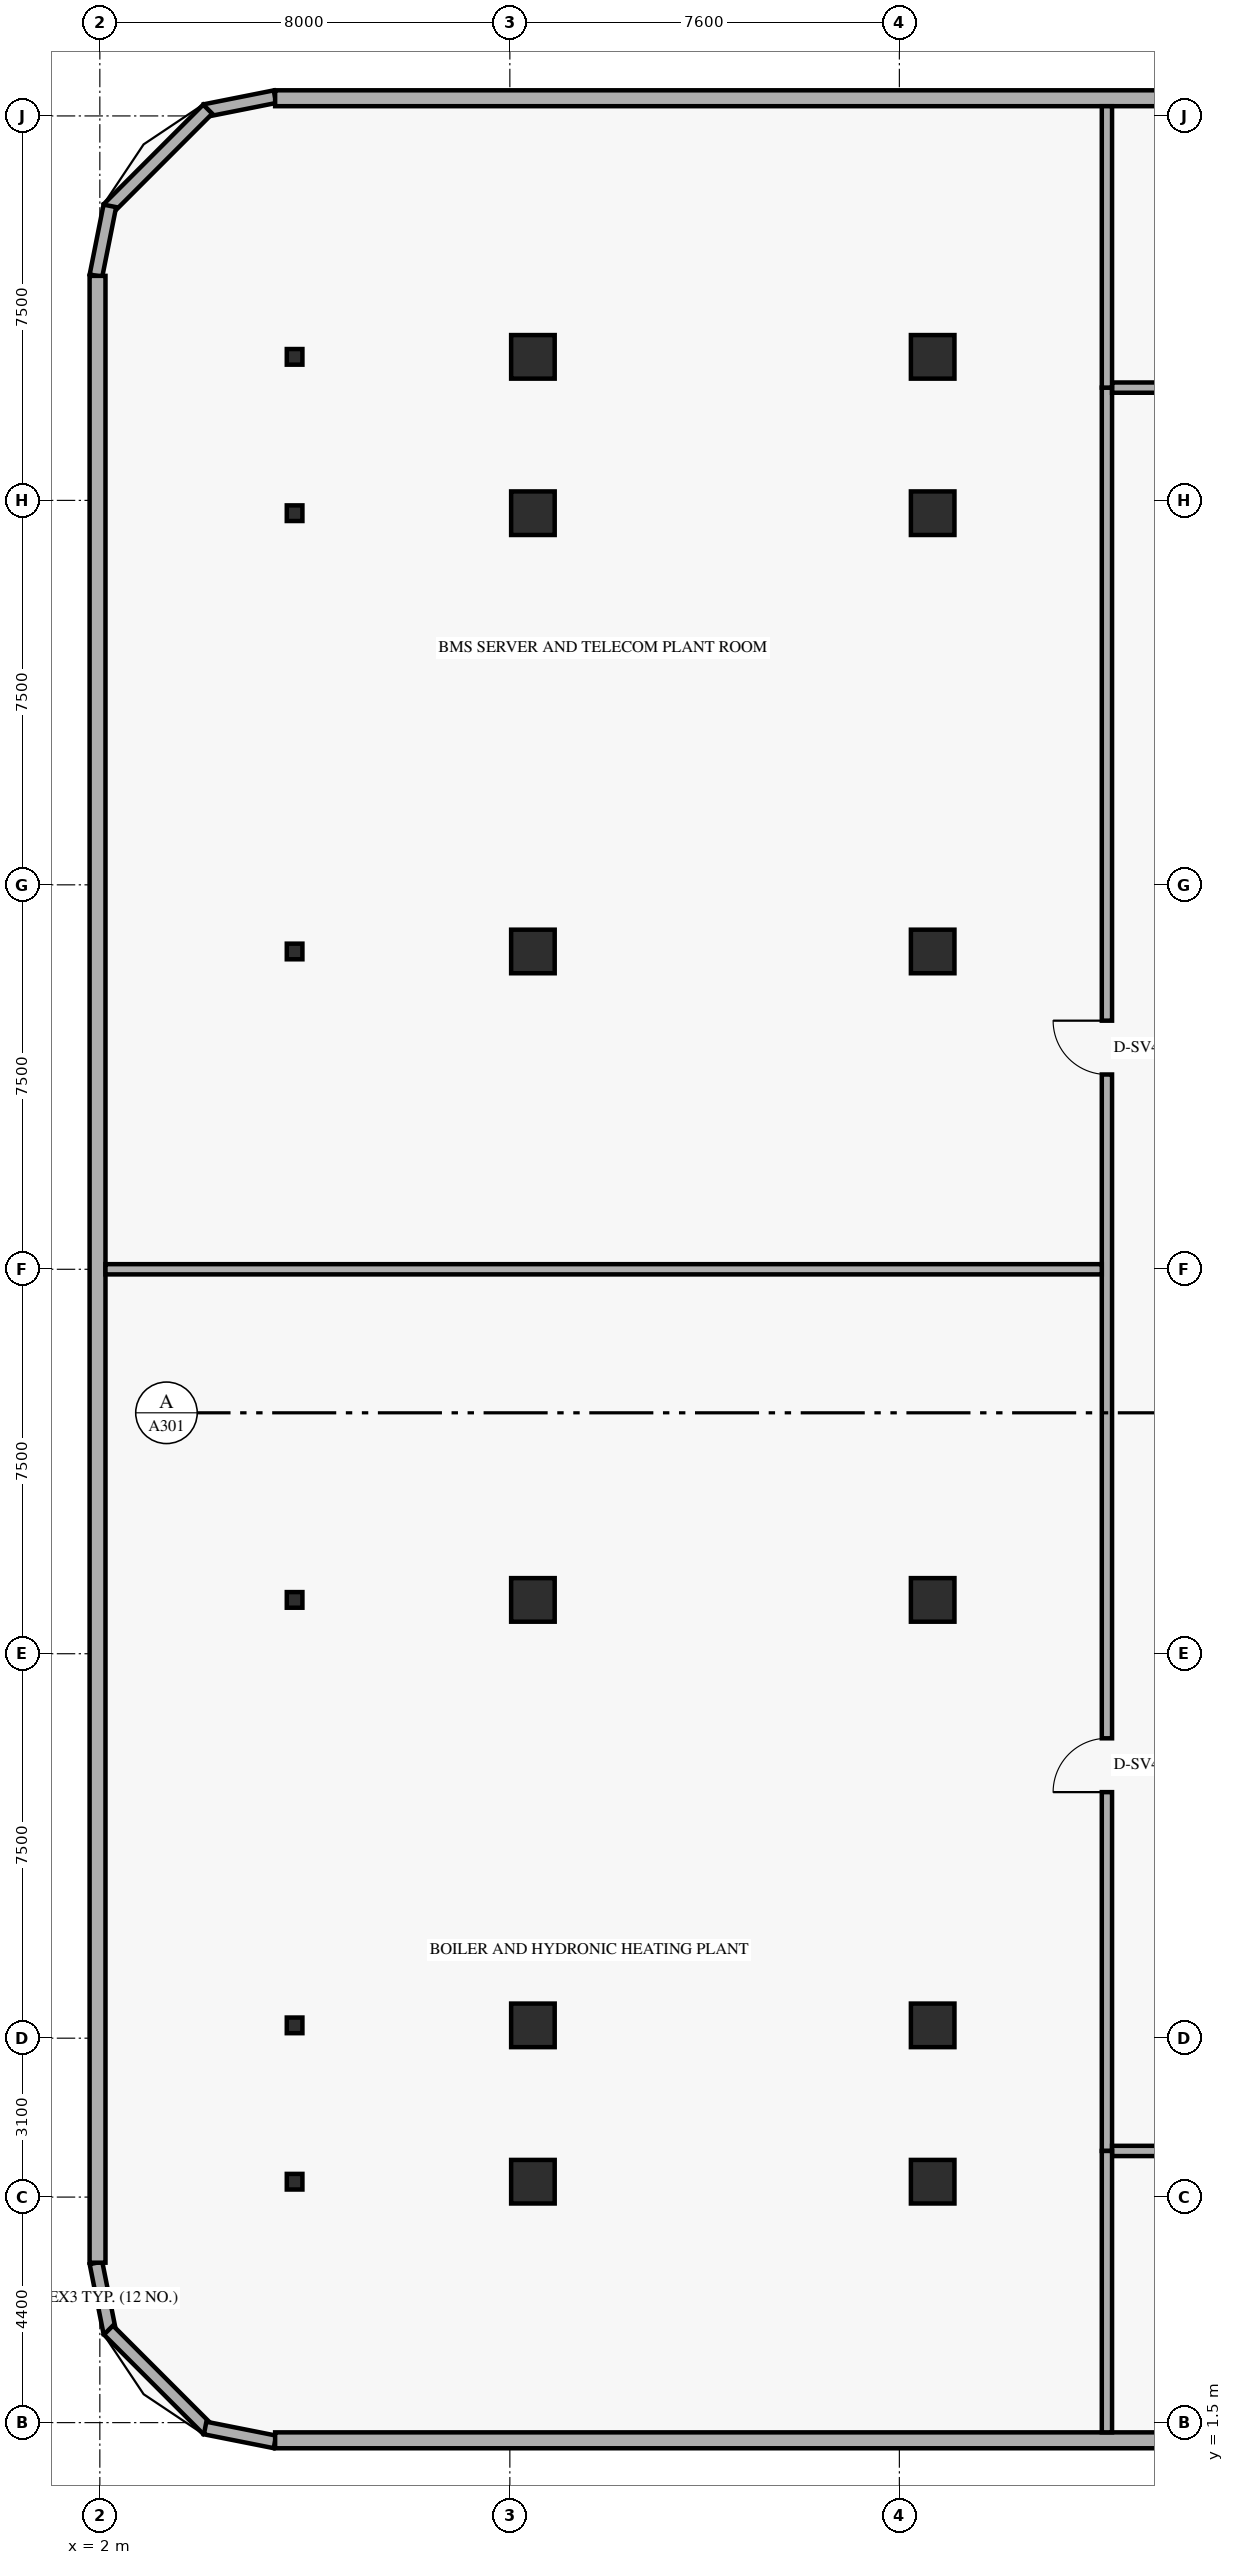
"""IFC4 building model, lengths in metres.
Left out: names, types, materials, properties, quantities, classifications, styles, units other than length and angle.
Written with IfcOpenShell. Run it as: python <this file> out.ifc"""

import sys

from ifc_helpers import new_model, si_unit, direction, frame, frame_2d, origin, origin_2d, place, context, subcontext, project, spatial, rectangle, hollow_rectangle, extrude, element, fill, save


model = new_model("IFC4")
c1 = context("Model", 3, precision=1e-05, world=origin(), true_north=direction((0.0, 1.0)))
c2 = subcontext(c1, "Body", "Model", "MODEL_VIEW")
j1 = project(units=[si_unit("LENGTHUNIT", "METRE"), si_unit("PLANEANGLEUNIT", "RADIAN")], contexts=[c1])
p1 = place(None, origin())
s1 = spatial("IfcSite", under=j1, at=p1, CompositionType="ELEMENT")
p2 = place(p1, origin())
s2 = spatial("IfcBuilding", under=s1, at=p2, CompositionType="ELEMENT")
p3 = place(p2, frame((0.0, 0.0, 71.4)))
s3 = spatial("IfcBuildingStorey", under=s2, at=p3, CompositionType="ELEMENT", Elevation=71.4)
for number, where, z_axis, x_axis in (
    (1, (5.8, 6.2, 0.0), (0.0, 0.0, 1.0), (1.0, 0.0, 0.0)),
    (2, (5.8, 9.25, 0.0), (0.0, 0.0, 1.0), (1.0, 0.0, 0.0)),
    (3, (5.8, 17.55, 0.0), (0.0, 0.0, 1.0), (1.0, 0.0, 0.0)),
    (4, (5.8, 30.2, 0.0), (0.0, 0.0, 1.0), (1.0, 0.0, 0.0)),
    (5, (5.8, 38.75, 0.0), (0.0, 0.0, 1.0), (1.0, 0.0, 0.0)),
    (6, (5.8, 41.8, 0.0), (0.0, 0.0, 1.0), (1.0, 0.0, 0.0)),
):
    element("IfcColumn", number, at=place(p3, frame(where, z_axis=z_axis, x_axis=x_axis)), inside=s3, PredefinedType="COLUMN", context=c2, shape_type="SweptSolid", body=[
        extrude(hollow_rectangle(XDim=0.305, YDim=0.305, WallThickness=0.013, at=origin_2d()), origin(), (0.0, 0.0, 1.0), 5.375),
    ])
for number, where, z_axis, x_axis in (
    (7, (10.45, 6.2, 0.0), (0.0, 0.0, 1.0), (1.0, 0.0, 0.0)),
    (8, (10.45, 9.25, 0.0), (0.0, 0.0, 1.0), (1.0, 0.0, 0.0)),
    (9, (10.45, 17.55, 0.0), (0.0, 0.0, 1.0), (1.0, 0.0, 0.0)),
    (10, (10.45, 30.2, 0.0), (0.0, 0.0, 1.0), (1.0, 0.0, 0.0)),
    (11, (10.45, 38.75, 0.0), (0.0, 0.0, 1.0), (1.0, 0.0, 0.0)),
    (12, (10.45, 41.8, 0.0), (0.0, 0.0, 1.0), (1.0, 0.0, 0.0)),
    (13, (18.25, 6.2, 0.0), (0.0, 0.0, 1.0), (1.0, 0.0, 0.0)),
    (14, (18.25, 9.25, 0.0), (0.0, 0.0, 1.0), (1.0, 0.0, 0.0)),
    (15, (18.25, 17.55, 0.0), (0.0, 0.0, 1.0), (1.0, 0.0, 0.0)),
    (16, (18.25, 30.2, 0.0), (0.0, 0.0, 1.0), (1.0, 0.0, 0.0)),
    (17, (18.25, 38.75, 0.0), (0.0, 0.0, 1.0), (1.0, 0.0, 0.0)),
    (18, (18.25, 41.8, 0.0), (0.0, 0.0, 1.0), (1.0, 0.0, 0.0)),
):
    element("IfcColumn", number, at=place(p3, frame(where, z_axis=z_axis, x_axis=x_axis)), inside=s3, PredefinedType="COLUMN", context=c2, shape_type="SweptSolid", body=[
        extrude(rectangle(XDim=0.85, YDim=0.85, at=origin_2d()), origin(), (0.0, 0.0, 1.0), 5.4),
    ])
p4 = place(p3, frame((1.924, 4.616, 0.0), z_axis=(0.0, 0.0, 1.0), x_axis=(0.19496651342, -0.980809899341, 0.0)))
e19 = element("IfcWall", 19, at=p4, inside=s3, PredefinedType="SOLIDWALL", context=c2, shape_type="SweptSolid", body=[
    extrude(rectangle(XDim=1.389, YDim=0.25, at=frame_2d((0.694, 0.0))), origin(), (0.0, 0.0, 1.0), 4.99),
])
p5 = place(p3, frame((2.168, 3.305, 0.0), z_axis=(0.0, 0.0, 1.0), x_axis=(0.707106781187, -0.707106781187, 0.0)))
e20 = element("IfcWall", 20, at=p5, inside=s3, PredefinedType="SOLIDWALL", context=c2, shape_type="SweptSolid", body=[
    extrude(rectangle(XDim=2.739, YDim=0.25, at=frame_2d((1.37, 0.0))), origin(), (0.0, 0.0, 1.0), 4.99),
])
for number, where, z_axis, x_axis in (
    (21, (4.054, 1.395, 0.0), (0.0, 0.0, 1.0), (0.981, -0.195, 0.0)),
    (22, (5.417, 46.876, 0.0), (0.0, 0.0, 1.0), (-0.981, -0.195, 0.0)),
):
    element("IfcWall", number, at=place(p3, frame(where, z_axis=z_axis, x_axis=x_axis)), inside=s3, PredefinedType="SOLIDWALL", context=c2, shape_type="SweptSolid", body=[
        extrude(rectangle(XDim=1.389, YDim=0.25, at=frame_2d((0.694, 0.0))), origin(), (0.0, 0.0, 1.0), 4.99),
    ])
p6 = place(p3, frame((4.105, 46.632, 0.0), z_axis=(0.0, 0.0, 1.0), x_axis=(-0.707106781187, -0.707106781187, 0.0)))
e23 = element("IfcWall", 23, at=p6, inside=s3, PredefinedType="SOLIDWALL", context=c2, shape_type="SweptSolid", body=[
    extrude(rectangle(XDim=2.739, YDim=0.25, at=frame_2d((1.37, 0.0))), origin(), (0.0, 0.0, 1.0), 4.99),
])
p7 = place(p3, frame((2.195, 44.746, 0.0), z_axis=(0.0, 0.0, 1.0), x_axis=(-0.19496651342, -0.980809899341, 0.0)))
e24 = element("IfcWall", 24, at=p7, inside=s3, PredefinedType="SOLIDWALL", context=c2, shape_type="SweptSolid", body=[
    extrude(rectangle(XDim=1.389, YDim=0.25, at=frame_2d((0.694, 0.0))), origin(), (0.0, 0.0, 1.0), 4.99),
])
for number, where, z_axis, x_axis in (
    (25, (5.42, 1.155, 0.0), (0.0, 0.0, 1.0), (1.0, 0.0, 0.0)),
    (26, (44.98, 46.845, 0.0), (0.0, 0.0, 1.0), (-1.0, 0.0, 0.0)),
):
    element("IfcWall", number, at=place(p3, frame(where, z_axis=z_axis, x_axis=x_axis)), inside=s3, PredefinedType="SOLIDWALL", context=c2, shape_type="SweptSolid", body=[
        extrude(rectangle(XDim=39.56, YDim=0.31, at=frame_2d((19.78, 0.0))), origin(), (0.0, 0.0, 1.0), 4.99),
    ])
p8 = place(p3, frame((1.955, 43.38, 0.0), z_axis=(0.0, 0.0, 1.0), x_axis=(0.0, -1.0, 0.0)))
e27 = element("IfcWall", 27, at=p8, inside=s3, PredefinedType="SOLIDWALL", context=c2, shape_type="SweptSolid", body=[
    extrude(rectangle(XDim=38.76, YDim=0.31, at=frame_2d((19.38, 0.0))), origin(), (0.0, 0.0, 1.0), 4.99),
])
p9 = place(p3, frame((21.65, 6.8, 0.0), z_axis=(0.0, 0.0, 1.0), x_axis=(0.0, 1.0, 0.0)))
e28 = element("IfcWall", 28, at=p9, inside=s3, PredefinedType="STANDARD", context=c2, shape_type="SweptSolid", body=[
    extrude(rectangle(XDim=34.4, YDim=0.2, at=frame_2d((17.2, 0.0))), origin(), (0.0, 0.0, 1.0), 4.279),
])
p10 = place(p9, frame((7.0, 0.0, 0.0)))
e29 = element("IfcOpeningElement", 29, at=p10, cuts=e28, PredefinedType="OPENING", context=c2, shape_type="SweptSolid", body=[
    extrude(rectangle(XDim=1.05, YDim=2.15, at=frame_2d((0.525, 1.075))), frame((0.0, 0.11, 0.0), z_axis=(0.0, -1.0, 0.0), x_axis=(1.0, 0.0, 0.0)), (0.0, 0.0, 1.0), 0.22),
])
p11 = place(p9, frame((21.0, 0.0, 0.0)))
e30 = element("IfcOpeningElement", 30, at=p11, cuts=e28, PredefinedType="OPENING", context=c2, shape_type="SweptSolid", body=[
    extrude(rectangle(XDim=1.05, YDim=2.15, at=frame_2d((0.525, 1.075))), frame((0.0, 0.11, 0.0), z_axis=(0.0, -1.0, 0.0), x_axis=(1.0, 0.0, 0.0)), (0.0, 0.0, 1.0), 0.22),
])
p12 = place(p3, frame((21.75, 6.8, 0.0), z_axis=(0.0, 0.0, 1.0), x_axis=(1.0, 0.0, 0.0)))
e31 = element("IfcWall", 31, at=p12, inside=s3, PredefinedType="STANDARD", context=c2, shape_type="SweptSolid", body=[
    extrude(rectangle(XDim=15.6, YDim=0.2, at=frame_2d((7.8, 0.0))), origin(), (0.0, 0.0, 1.0), 4.279),
])
p13 = place(p12, frame((5.1, 0.0, 0.0)))
e32 = element("IfcOpeningElement", 32, at=p13, cuts=e31, PredefinedType="OPENING", context=c2, shape_type="SweptSolid", body=[
    extrude(rectangle(XDim=0.9, YDim=2.1, at=frame_2d((0.45, 1.05))), frame((0.0, 0.11, 0.0), z_axis=(0.0, -1.0, 0.0), x_axis=(1.0, 0.0, 0.0)), (0.0, 0.0, 1.0), 0.22),
])
p14 = place(p3, frame((21.75, 41.2, 0.0), z_axis=(0.0, 0.0, 1.0), x_axis=(1.0, 0.0, 0.0)))
e33 = element("IfcWall", 33, at=p14, inside=s3, PredefinedType="STANDARD", context=c2, shape_type="SweptSolid", body=[
    extrude(rectangle(XDim=15.6, YDim=0.2, at=frame_2d((7.8, 0.0))), origin(), (0.0, 0.0, 1.0), 4.279),
])
p15 = place(p14, frame((5.1, 0.0, 0.0)))
e34 = element("IfcOpeningElement", 34, at=p15, cuts=e33, PredefinedType="OPENING", context=c2, shape_type="SweptSolid", body=[
    extrude(rectangle(XDim=0.9, YDim=2.1, at=frame_2d((0.45, 1.05))), frame((0.0, 0.11, 0.0), z_axis=(0.0, -1.0, 0.0), x_axis=(1.0, 0.0, 0.0)), (0.0, 0.0, 1.0), 0.22),
])
for number, where, z_axis, x_axis in (
    (35, (21.65, 1.31, 0.0), (0.0, 0.0, 1.0), (0.0, 1.0, 0.0)),
    (36, (21.65, 41.2, 0.0), (0.0, 0.0, 1.0), (0.0, 1.0, 0.0)),
):
    element("IfcWall", number, at=place(p3, frame(where, z_axis=z_axis, x_axis=x_axis)), inside=s3, PredefinedType="STANDARD", context=c2, shape_type="SweptSolid", body=[
        extrude(rectangle(XDim=5.49, YDim=0.2, at=frame_2d((2.745, 0.0))), origin(), (0.0, 0.0, 1.0), 4.439),
    ])
p16 = place(p3, frame((2.11, 24.0, 0.0), z_axis=(0.0, 0.0, 1.0), x_axis=(1.0, 0.0, 0.0)))
e37 = element("IfcWall", 37, at=p16, inside=s3, PredefinedType="STANDARD", context=c2, shape_type="SweptSolid", body=[
    extrude(rectangle(XDim=19.44, YDim=0.2, at=frame_2d((9.72, 0.0))), origin(), (0.0, 0.0, 1.0), 4.279),
])
p17 = place(p10, origin())
e38 = element("IfcDoor", 38, at=p17, inside=s3, OperationType="SINGLE_SWING_LEFT", PredefinedType="DOOR", context=c2, shape_type="SweptSolid", body=[
    extrude(rectangle(XDim=1.05, YDim=2.15, at=frame_2d((0.525, 1.075))), frame((0.0, 0.025, 0.0), z_axis=(0.0, -1.0, 0.0), x_axis=(1.0, 0.0, 0.0)), (0.0, 0.0, 1.0), 0.05),
])
fill(e29, e38)
p18 = place(p11, origin())
e39 = element("IfcDoor", 39, at=p18, inside=s3, OperationType="SINGLE_SWING_RIGHT", PredefinedType="DOOR", context=c2, shape_type="SweptSolid", body=[
    extrude(rectangle(XDim=1.05, YDim=2.15, at=frame_2d((0.525, 1.075))), frame((0.0, 0.025, 0.0), z_axis=(0.0, -1.0, 0.0), x_axis=(1.0, 0.0, 0.0)), (0.0, 0.0, 1.0), 0.05),
])
fill(e30, e39)
save(model, sys.argv[1])
